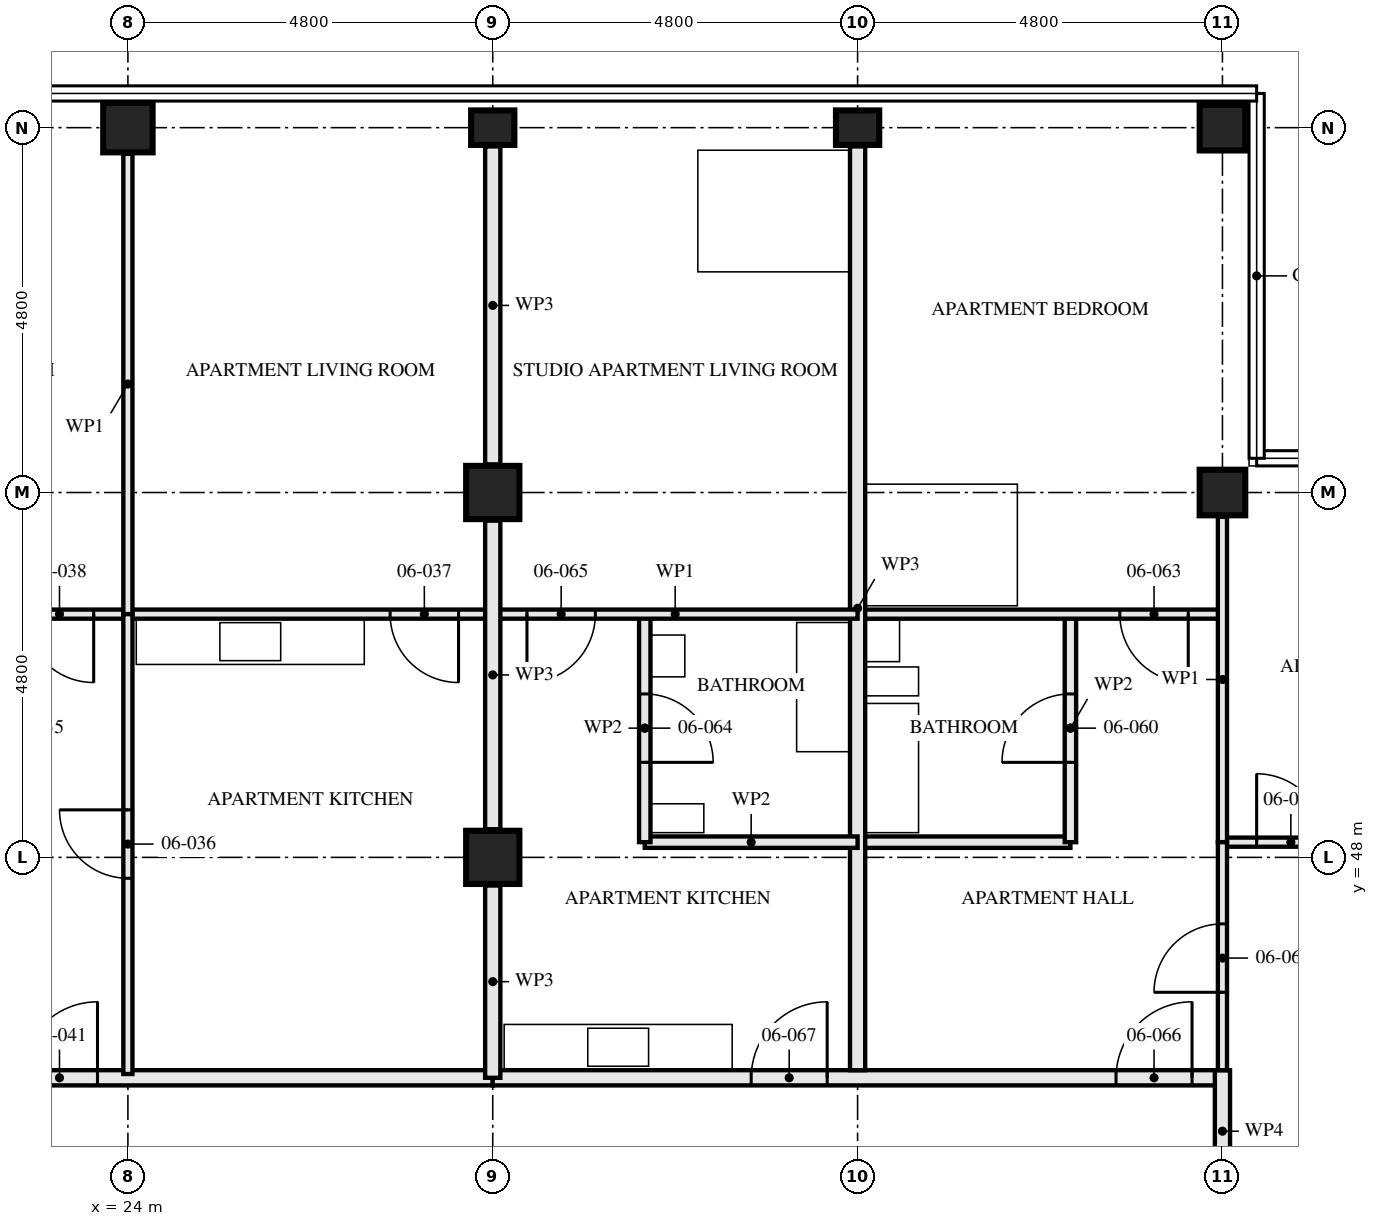
"""IFC4 building model, lengths in metres.
Left out: names, types, materials, properties, quantities, classifications, styles, units other than length and angle.
Written with IfcOpenShell. Run it as: python <this file> out.ifc"""

import sys

from ifc_helpers import new_model, si_unit, direction, frame, frame_2d, origin, origin_2d, place, context, subcontext, project, spatial, rectangle, hollow_rectangle, i_section, extrude, element, fill, save


model = new_model("IFC4")
c1 = context("Model", 3, precision=1e-05, world=origin(), true_north=direction((0.0, 1.0)))
c2 = subcontext(c1, "Body", "Model", "MODEL_VIEW")
j1 = project(units=[si_unit("LENGTHUNIT", "METRE"), si_unit("PLANEANGLEUNIT", "RADIAN")], contexts=[c1])
p1 = place(None, origin())
s1 = spatial("IfcSite", under=j1, at=p1, CompositionType="ELEMENT")
p2 = place(p1, origin())
s2 = spatial("IfcBuilding", under=s1, at=p2, CompositionType="ELEMENT")
p3 = place(p2, frame((0.0, 0.0, 27.0)))
s3 = spatial("IfcBuildingStorey", under=s2, at=p3, CompositionType="ELEMENT", Elevation=27.0)
p4 = place(p3, frame((24.0, 57.6, 0.0), z_axis=(0.0, 0.0, 1.0), x_axis=(0.0, 1.0, 0.0)))
e1 = element("IfcColumn", 1, at=p4, inside=s3, PredefinedType="COLUMN", context=c2, shape_type="SweptSolid", body=[
    extrude(hollow_rectangle(XDim=0.65, YDim=0.65, WallThickness=0.08, at=origin_2d()), origin(), (0.0, 0.0, 1.0), 3.5),
])
for number, where, z_axis, x_axis in (
    (2, (28.8, 48.0, 0.0), (0.0, 0.0, 1.0), (1.0, 0.0, 0.0)),
    (3, (28.8, 52.8, 0.0), (0.0, 0.0, 1.0), (1.0, 0.0, 0.0)),
):
    element("IfcColumn", number, at=place(p3, frame(where, z_axis=z_axis, x_axis=x_axis)), inside=s3, PredefinedType="COLUMN", context=c2, shape_type="SweptSolid", body=[
        extrude(hollow_rectangle(XDim=0.7, YDim=0.7, WallThickness=0.06, at=origin_2d()), origin(), (0.0, 0.0, 1.0), 3.5),
    ])
for number, where, z_axis, x_axis in (
    (4, (28.8, 57.6, 0.0), (0.0, 0.0, 1.0), (0.0, 1.0, 0.0)),
    (5, (33.6, 57.6, 0.0), (0.0, 0.0, 1.0), (0.0, 1.0, 0.0)),
):
    element("IfcColumn", number, at=place(p3, frame(where, z_axis=z_axis, x_axis=x_axis)), inside=s3, PredefinedType="COLUMN", context=c2, shape_type="SweptSolid", body=[
        extrude(i_section(OverallWidth=0.454, OverallDepth=0.569, WebThickness=0.078, FlangeThickness=0.125, FilletRadius=0.015, at=origin_2d()), origin(), (0.0, 0.0, 1.0), 3.5),
    ])
for number, where, z_axis, x_axis in (
    (6, (38.4, 52.8, 0.0), (0.0, 0.0, 1.0), (0.0, 1.0, 0.0)),
    (7, (38.4, 57.6, 0.0), (0.0, 0.0, 1.0), (0.0, 1.0, 0.0)),
):
    element("IfcColumn", number, at=place(p3, frame(where, z_axis=z_axis, x_axis=x_axis)), inside=s3, PredefinedType="COLUMN", context=c2, shape_type="SweptSolid", body=[
        extrude(hollow_rectangle(XDim=0.6, YDim=0.6, WallThickness=0.05, at=origin_2d()), origin(), (0.0, 0.0, 1.0), 3.5),
    ])
p5 = place(p3, frame((24.0, 51.2, 0.0), z_axis=(0.0, 0.0, 1.0), x_axis=(0.0, -1.0, 0.0)))
e8 = element("IfcWall", 8, at=p5, inside=s3, PredefinedType="PARTITIONING", context=c2, shape_type="SweptSolid", body=[
    extrude(rectangle(XDim=6.05, YDim=0.12, at=frame_2d((3.025, 0.0))), origin(), (0.0, 0.0, 1.0), 2.55),
])
p6 = place(p5, frame((2.575, 0.0, 0.0)))
e9 = element("IfcOpeningElement", 9, at=p6, cuts=e8, PredefinedType="OPENING", context=c2, shape_type="SweptSolid", body=[
    extrude(rectangle(XDim=0.9, YDim=2.1, at=frame_2d((0.45, 1.05))), frame((0.0, 0.071, 0.0), z_axis=(0.0, -1.0, 0.0), x_axis=(1.0, 0.0, 0.0)), (0.0, 0.0, 1.0), 0.141),
])
p7 = place(p3, frame((28.8, 51.2, 0.0), z_axis=(0.0, 0.0, 1.0), x_axis=(-1.0, 0.0, 0.0)))
e10 = element("IfcWall", 10, at=p7, inside=s3, PredefinedType="PARTITIONING", context=c2, shape_type="SweptSolid", body=[
    extrude(rectangle(XDim=4.8, YDim=0.12, at=frame_2d((2.4, 0.0))), origin(), (0.0, 0.0, 1.0), 3.33),
])
p8 = place(p7, frame((0.45, 0.0, 0.0)))
e11 = element("IfcOpeningElement", 11, at=p8, cuts=e10, PredefinedType="OPENING", context=c2, shape_type="SweptSolid", body=[
    extrude(rectangle(XDim=0.9, YDim=2.1, at=frame_2d((0.45, 1.05))), frame((0.0, 0.071, 0.0), z_axis=(0.0, -1.0, 0.0), x_axis=(1.0, 0.0, 0.0)), (0.0, 0.0, 1.0), 0.141),
])
p9 = place(p3, frame((24.0, 51.2, 0.0), z_axis=(0.0, 0.0, 1.0), x_axis=(-1.0, 0.0, 0.0)))
e12 = element("IfcWall", 12, at=p9, inside=s3, PredefinedType="PARTITIONING", context=c2, shape_type="SweptSolid", body=[
    extrude(rectangle(XDim=4.8, YDim=0.12, at=frame_2d((2.4, 0.0))), origin(), (0.0, 0.0, 1.0), 3.33),
])
p10 = place(p9, frame((0.45, 0.0, 0.0)))
e13 = element("IfcOpeningElement", 13, at=p10, cuts=e12, PredefinedType="OPENING", context=c2, shape_type="SweptSolid", body=[
    extrude(rectangle(XDim=0.9, YDim=2.1, at=frame_2d((0.45, 1.05))), frame((0.0, 0.071, 0.0), z_axis=(0.0, -1.0, 0.0), x_axis=(1.0, 0.0, 0.0)), (0.0, 0.0, 1.0), 0.141),
])
p11 = place(p3, frame((24.0, 57.255, 0.0), z_axis=(0.0, 0.0, 1.0), x_axis=(0.0, -1.0, 0.0)))
e14 = element("IfcWall", 14, at=p11, inside=s3, PredefinedType="PARTITIONING", context=c2, shape_type="SweptSolid", body=[
    extrude(rectangle(XDim=6.055, YDim=0.12, at=frame_2d((3.027, 0.0))), origin(), (0.0, 0.0, 1.0), 2.55),
])
p12 = place(p3, frame((28.8, 45.1, 0.0), z_axis=(0.0, 0.0, 1.0), x_axis=(-1.0, 0.0, 0.0)))
e15 = element("IfcWall", 15, at=p12, inside=s3, PredefinedType="PARTITIONING", context=c2, shape_type="SweptSolid", body=[
    extrude(rectangle(XDim=14.4, YDim=0.2, at=frame_2d((7.2, 0.0))), origin(), (0.0, 0.0, 1.0), 3.33),
])
p13 = place(p12, frame((5.2, 0.0, 0.0)))
e16 = element("IfcOpeningElement", 16, at=p13, cuts=e15, PredefinedType="OPENING", context=c2, shape_type="SweptSolid", body=[
    extrude(rectangle(XDim=1.0, YDim=2.1, at=frame_2d((0.5, 1.05))), frame((0.0, 0.111, 0.0), z_axis=(0.0, -1.0, 0.0), x_axis=(1.0, 0.0, 0.0)), (0.0, 0.0, 1.0), 0.221),
])
p14 = place(p12, frame((10.0, 0.0, 0.0)))
e17 = element("IfcOpeningElement", 17, at=p14, cuts=e15, PredefinedType="OPENING", context=c2, shape_type="SweptSolid", body=[
    extrude(rectangle(XDim=1.0, YDim=2.1, at=frame_2d((0.5, 1.05))), frame((0.0, 0.111, 0.0), z_axis=(0.0, -1.0, 0.0), x_axis=(1.0, 0.0, 0.0)), (0.0, 0.0, 1.0), 0.221),
])
p15 = place(p3, frame((36.4, 51.2, 0.0), z_axis=(0.0, 0.0, 1.0), x_axis=(0.0, -1.0, 0.0)))
e18 = element("IfcWall", 18, at=p15, inside=s3, PredefinedType="PARTITIONING", context=c2, shape_type="SweptSolid", body=[
    extrude(rectangle(XDim=3.0, YDim=0.15, at=frame_2d((1.5, 0.0))), origin(), (0.0, 0.0, 1.0), 3.33),
])
p16 = place(p15, frame((1.05, 0.0, 0.0)))
e19 = element("IfcOpeningElement", 19, at=p16, cuts=e18, PredefinedType="OPENING", context=c2, shape_type="SweptSolid", body=[
    extrude(rectangle(XDim=0.9, YDim=2.1, at=frame_2d((0.45, 1.05))), frame((0.0, 0.085, 0.0), z_axis=(0.0, -1.0, 0.0), x_axis=(1.0, 0.0, 0.0)), (0.0, 0.0, 1.0), 0.171),
])
p17 = place(p3, frame((36.4, 48.2, 0.0), z_axis=(0.0, 0.0, 1.0), x_axis=(-1.0, 0.0, 0.0)))
e20 = element("IfcWall", 20, at=p17, inside=s3, PredefinedType="PARTITIONING", context=c2, shape_type="SweptSolid", body=[
    extrude(rectangle(XDim=2.8, YDim=0.15, at=frame_2d((1.4, 0.0))), origin(), (0.0, 0.0, 1.0), 3.33),
])
p18 = place(p3, frame((38.4, 48.2, 0.0), z_axis=(0.0, 0.0, 1.0), x_axis=(0.0, -1.0, 0.0)))
e21 = element("IfcWall", 21, at=p18, inside=s3, PredefinedType="PARTITIONING", context=c2, shape_type="SweptSolid", body=[
    extrude(rectangle(XDim=3.0, YDim=0.12, at=frame_2d((1.5, 0.0))), origin(), (0.0, 0.0, 1.0), 2.55),
])
p19 = place(p18, frame((1.075, 0.0, 0.0)))
e22 = element("IfcOpeningElement", 22, at=p19, cuts=e21, PredefinedType="OPENING", context=c2, shape_type="SweptSolid", body=[
    extrude(rectangle(XDim=0.9, YDim=2.1, at=frame_2d((0.45, 1.05))), frame((0.0, 0.071, 0.0), z_axis=(0.0, -1.0, 0.0), x_axis=(1.0, 0.0, 0.0)), (0.0, 0.0, 1.0), 0.141),
])
p20 = place(p3, frame((42.953, 48.2, 0.0), z_axis=(0.0, 0.0, 1.0), x_axis=(-1.0, 0.0, 0.0)))
e23 = element("IfcWall", 23, at=p20, inside=s3, PredefinedType="PARTITIONING", context=c2, shape_type="SweptSolid", body=[
    extrude(rectangle(XDim=4.553, YDim=0.12, at=frame_2d((2.276, 0.0))), origin(), (0.0, 0.0, 1.0), 3.33),
])
p21 = place(p20, frame((3.203, 0.0, 0.0)))
e24 = element("IfcOpeningElement", 24, at=p21, cuts=e23, PredefinedType="OPENING", context=c2, shape_type="SweptSolid", body=[
    extrude(rectangle(XDim=0.9, YDim=2.1, at=frame_2d((0.45, 1.05))), frame((0.0, 0.071, 0.0), z_axis=(0.0, -1.0, 0.0), x_axis=(1.0, 0.0, 0.0)), (0.0, 0.0, 1.0), 0.141),
])
p22 = place(p3, frame((38.4, 51.2, 0.0), z_axis=(0.0, 0.0, 1.0), x_axis=(-1.0, 0.0, 0.0)))
e25 = element("IfcWall", 25, at=p22, inside=s3, PredefinedType="PARTITIONING", context=c2, shape_type="SweptSolid", body=[
    extrude(rectangle(XDim=4.8, YDim=0.12, at=frame_2d((2.4, 0.0))), origin(), (0.0, 0.0, 1.0), 3.33),
])
p23 = place(p22, frame((0.45, 0.0, 0.0)))
e26 = element("IfcOpeningElement", 26, at=p23, cuts=e25, PredefinedType="OPENING", context=c2, shape_type="SweptSolid", body=[
    extrude(rectangle(XDim=0.9, YDim=2.1, at=frame_2d((0.45, 1.05))), frame((0.0, 0.071, 0.0), z_axis=(0.0, -1.0, 0.0), x_axis=(1.0, 0.0, 0.0)), (0.0, 0.0, 1.0), 0.141),
])
p24 = place(p3, frame((38.4, 52.48, 0.0), z_axis=(0.0, 0.0, 1.0), x_axis=(0.0, -1.0, 0.0)))
e27 = element("IfcWall", 27, at=p24, inside=s3, PredefinedType="PARTITIONING", context=c2, shape_type="SweptSolid", body=[
    extrude(rectangle(XDim=4.28, YDim=0.12, at=frame_2d((2.14, 0.0))), origin(), (0.0, 0.0, 1.0), 3.33),
])
p25 = place(p3, frame((33.6, 57.353, 0.0), z_axis=(0.0, 0.0, 1.0), x_axis=(0.0, -1.0, 0.0)))
e28 = element("IfcWall", 28, at=p25, inside=s3, PredefinedType="PARTITIONING", context=c2, shape_type="SweptSolid", body=[
    extrude(rectangle(XDim=12.153, YDim=0.2, at=frame_2d((6.077, 0.0))), origin(), (0.0, 0.0, 1.0), 2.55),
])
p26 = place(p3, frame((30.8, 51.2, 0.0), z_axis=(0.0, 0.0, 1.0), x_axis=(0.0, -1.0, 0.0)))
e29 = element("IfcWall", 29, at=p26, inside=s3, PredefinedType="PARTITIONING", context=c2, shape_type="SweptSolid", body=[
    extrude(rectangle(XDim=3.0, YDim=0.15, at=frame_2d((1.5, 0.0))), origin(), (0.0, 0.0, 1.0), 3.33),
])
p27 = place(p26, frame((1.05, 0.0, 0.0)))
e30 = element("IfcOpeningElement", 30, at=p27, cuts=e29, PredefinedType="OPENING", context=c2, shape_type="SweptSolid", body=[
    extrude(rectangle(XDim=0.9, YDim=2.1, at=frame_2d((0.45, 1.05))), frame((0.0, 0.085, 0.0), z_axis=(0.0, -1.0, 0.0), x_axis=(1.0, 0.0, 0.0)), (0.0, 0.0, 1.0), 0.171),
])
p28 = place(p3, frame((33.6, 48.2, 0.0), z_axis=(0.0, 0.0, 1.0), x_axis=(-1.0, 0.0, 0.0)))
e31 = element("IfcWall", 31, at=p28, inside=s3, PredefinedType="PARTITIONING", context=c2, shape_type="SweptSolid", body=[
    extrude(rectangle(XDim=2.8, YDim=0.15, at=frame_2d((1.4, 0.0))), origin(), (0.0, 0.0, 1.0), 3.33),
])
p29 = place(p3, frame((33.6, 51.2, 0.0), z_axis=(0.0, 0.0, 1.0), x_axis=(-1.0, 0.0, 0.0)))
e32 = element("IfcWall", 32, at=p29, inside=s3, PredefinedType="PARTITIONING", context=c2, shape_type="SweptSolid", body=[
    extrude(rectangle(XDim=4.8, YDim=0.12, at=frame_2d((2.4, 0.0))), origin(), (0.0, 0.0, 1.0), 3.33),
])
p30 = place(p29, frame((3.45, 0.0, 0.0)))
e33 = element("IfcOpeningElement", 33, at=p30, cuts=e32, PredefinedType="OPENING", context=c2, shape_type="SweptSolid", body=[
    extrude(rectangle(XDim=0.9, YDim=2.1, at=frame_2d((0.45, 1.05))), frame((0.0, 0.071, 0.0), z_axis=(0.0, -1.0, 0.0), x_axis=(1.0, 0.0, 0.0)), (0.0, 0.0, 1.0), 0.141),
])
p31 = place(p3, frame((38.4, 45.1, 0.0), z_axis=(0.0, 0.0, 1.0), x_axis=(-1.0, 0.0, 0.0)))
e34 = element("IfcWall", 34, at=p31, inside=s3, PredefinedType="PARTITIONING", context=c2, shape_type="SweptSolid", body=[
    extrude(rectangle(XDim=9.6, YDim=0.2, at=frame_2d((4.8, 0.0))), origin(), (0.0, 0.0, 1.0), 3.33),
])
p32 = place(p31, frame((0.4, 0.0, 0.0)))
e35 = element("IfcOpeningElement", 35, at=p32, cuts=e34, PredefinedType="OPENING", context=c2, shape_type="SweptSolid", body=[
    extrude(rectangle(XDim=1.0, YDim=2.1, at=frame_2d((0.5, 1.05))), frame((0.0, 0.111, 0.0), z_axis=(0.0, -1.0, 0.0), x_axis=(1.0, 0.0, 0.0)), (0.0, 0.0, 1.0), 0.221),
])
p33 = place(p31, frame((5.2, 0.0, 0.0)))
e36 = element("IfcOpeningElement", 36, at=p33, cuts=e34, PredefinedType="OPENING", context=c2, shape_type="SweptSolid", body=[
    extrude(rectangle(XDim=1.0, YDim=2.1, at=frame_2d((0.5, 1.05))), frame((0.0, 0.111, 0.0), z_axis=(0.0, -1.0, 0.0), x_axis=(1.0, 0.0, 0.0)), (0.0, 0.0, 1.0), 0.221),
])
p34 = place(p3, frame((38.4, 45.2, 0.0), z_axis=(0.0, 0.0, 1.0), x_axis=(0.0, -1.0, 0.0)))
e37 = element("IfcWall", 37, at=p34, inside=s3, PredefinedType="PARTITIONING", context=c2, shape_type="SweptSolid", body=[
    extrude(rectangle(XDim=1.605, YDim=0.2, at=frame_2d((0.802, 0.0))), origin(), (0.0, 0.0, 1.0), 3.33),
])
p35 = place(p3, frame((28.8, 45.1, 0.0), z_axis=(0.0, 0.0, 1.0), x_axis=(0.0, 1.0, 0.0)))
e38 = element("IfcWall", 38, at=p35, inside=s3, PredefinedType="PARTITIONING", context=c2, shape_type="SweptSolid", body=[
    extrude(rectangle(XDim=2.53, YDim=0.2, at=frame_2d((1.265, 0.0))), origin(), (0.0, 0.0, 1.0), 2.32),
])
p36 = place(p3, frame((28.8, 48.37, 0.0), z_axis=(0.0, 0.0, 1.0), x_axis=(0.0, 1.0, 0.0)))
e39 = element("IfcWall", 39, at=p36, inside=s3, PredefinedType="PARTITIONING", context=c2, shape_type="SweptSolid", body=[
    extrude(rectangle(XDim=4.06, YDim=0.2, at=frame_2d((2.03, 0.0))), origin(), (0.0, 0.0, 1.0), 2.32),
])
p37 = place(p3, frame((28.8, 53.17, 0.0), z_axis=(0.0, 0.0, 1.0), x_axis=(0.0, 1.0, 0.0)))
e40 = element("IfcWall", 40, at=p37, inside=s3, PredefinedType="PARTITIONING", context=c2, shape_type="SweptSolid", body=[
    extrude(rectangle(XDim=4.183, YDim=0.2, at=frame_2d((2.092, 0.0))), origin(), (0.0, 0.0, 1.0), 2.32),
])
p38 = place(p6, frame((0.9, 0.0, 0.0), z_axis=(0.0, 0.0, 1.0), x_axis=(-1.0, 0.0, 0.0)))
e41 = element("IfcDoor", 41, at=p38, inside=s3, OperationType="SINGLE_SWING_LEFT", PredefinedType="DOOR", context=c2, shape_type="SweptSolid", body=[
    extrude(rectangle(XDim=0.9, YDim=2.1, at=frame_2d((0.45, 1.05))), frame((0.0, 0.022, 0.0), z_axis=(0.0, -1.0, 0.0), x_axis=(1.0, 0.0, 0.0)), (0.0, 0.0, 1.0), 0.044),
])
fill(e9, e41)
p39 = place(p8, origin())
e42 = element("IfcDoor", 42, at=p39, inside=s3, OperationType="SINGLE_SWING_RIGHT", PredefinedType="DOOR", context=c2, shape_type="SweptSolid", body=[
    extrude(rectangle(XDim=0.9, YDim=2.1, at=frame_2d((0.45, 1.05))), frame((0.0, 0.022, 0.0), z_axis=(0.0, -1.0, 0.0), x_axis=(1.0, 0.0, 0.0)), (0.0, 0.0, 1.0), 0.044),
])
fill(e11, e42)
p40 = place(p10, origin())
e43 = element("IfcDoor", 43, at=p40, inside=s3, OperationType="SINGLE_SWING_RIGHT", PredefinedType="DOOR", context=c2, shape_type="SweptSolid", body=[
    extrude(rectangle(XDim=0.9, YDim=2.1, at=frame_2d((0.45, 1.05))), frame((0.0, 0.022, 0.0), z_axis=(0.0, -1.0, 0.0), x_axis=(1.0, 0.0, 0.0)), (0.0, 0.0, 1.0), 0.044),
])
fill(e13, e43)
p41 = place(p13, frame((1.0, 0.0, 0.0), z_axis=(0.0, 0.0, 1.0), x_axis=(-1.0, 0.0, 0.0)))
e44 = element("IfcDoor", 44, at=p41, inside=s3, OperationType="SINGLE_SWING_LEFT", PredefinedType="DOOR", context=c2, shape_type="SweptSolid", body=[
    extrude(rectangle(XDim=1.0, YDim=2.1, at=frame_2d((0.5, 1.05))), frame((0.0, 0.027, 0.0), z_axis=(0.0, -1.0, 0.0), x_axis=(1.0, 0.0, 0.0)), (0.0, 0.0, 1.0), 0.054),
])
fill(e16, e44)
p42 = place(p16, frame((0.9, 0.0, 0.0), z_axis=(0.0, 0.0, 1.0), x_axis=(-1.0, 0.0, 0.0)))
e45 = element("IfcDoor", 45, at=p42, inside=s3, OperationType="SINGLE_SWING_RIGHT", PredefinedType="DOOR", context=c2, shape_type="SweptSolid", body=[
    extrude(rectangle(XDim=0.9, YDim=2.1, at=frame_2d((0.45, 1.05))), frame((0.0, 0.022, 0.0), z_axis=(0.0, -1.0, 0.0), x_axis=(1.0, 0.0, 0.0)), (0.0, 0.0, 1.0), 0.044),
])
fill(e19, e45)
p43 = place(p19, frame((0.9, 0.0, 0.0), z_axis=(0.0, 0.0, 1.0), x_axis=(-1.0, 0.0, 0.0)))
e46 = element("IfcDoor", 46, at=p43, inside=s3, OperationType="SINGLE_SWING_RIGHT", PredefinedType="DOOR", context=c2, shape_type="SweptSolid", body=[
    extrude(rectangle(XDim=0.9, YDim=2.1, at=frame_2d((0.45, 1.05))), frame((0.0, 0.022, 0.0), z_axis=(0.0, -1.0, 0.0), x_axis=(1.0, 0.0, 0.0)), (0.0, 0.0, 1.0), 0.044),
])
fill(e22, e46)
p44 = place(p21, frame((0.9, 0.0, 0.0), z_axis=(0.0, 0.0, 1.0), x_axis=(-1.0, 0.0, 0.0)))
e47 = element("IfcDoor", 47, at=p44, inside=s3, OperationType="SINGLE_SWING_RIGHT", PredefinedType="DOOR", context=c2, shape_type="SweptSolid", body=[
    extrude(rectangle(XDim=0.9, YDim=2.1, at=frame_2d((0.45, 1.05))), frame((0.0, 0.022, 0.0), z_axis=(0.0, -1.0, 0.0), x_axis=(1.0, 0.0, 0.0)), (0.0, 0.0, 1.0), 0.044),
])
fill(e24, e47)
p45 = place(p23, origin())
e48 = element("IfcDoor", 48, at=p45, inside=s3, OperationType="SINGLE_SWING_RIGHT", PredefinedType="DOOR", context=c2, shape_type="SweptSolid", body=[
    extrude(rectangle(XDim=0.9, YDim=2.1, at=frame_2d((0.45, 1.05))), frame((0.0, 0.022, 0.0), z_axis=(0.0, -1.0, 0.0), x_axis=(1.0, 0.0, 0.0)), (0.0, 0.0, 1.0), 0.044),
])
fill(e26, e48)
p46 = place(p27, origin())
e49 = element("IfcDoor", 49, at=p46, inside=s3, OperationType="SINGLE_SWING_LEFT", PredefinedType="DOOR", context=c2, shape_type="SweptSolid", body=[
    extrude(rectangle(XDim=0.9, YDim=2.1, at=frame_2d((0.45, 1.05))), frame((0.0, 0.022, 0.0), z_axis=(0.0, -1.0, 0.0), x_axis=(1.0, 0.0, 0.0)), (0.0, 0.0, 1.0), 0.044),
])
fill(e30, e49)
p47 = place(p30, origin())
e50 = element("IfcDoor", 50, at=p47, inside=s3, OperationType="SINGLE_SWING_LEFT", PredefinedType="DOOR", context=c2, shape_type="SweptSolid", body=[
    extrude(rectangle(XDim=0.9, YDim=2.1, at=frame_2d((0.45, 1.05))), frame((0.0, 0.022, 0.0), z_axis=(0.0, -1.0, 0.0), x_axis=(1.0, 0.0, 0.0)), (0.0, 0.0, 1.0), 0.044),
])
fill(e33, e50)
p48 = place(p32, frame((1.0, 0.0, 0.0), z_axis=(0.0, 0.0, 1.0), x_axis=(-1.0, 0.0, 0.0)))
e51 = element("IfcDoor", 51, at=p48, inside=s3, OperationType="SINGLE_SWING_LEFT", PredefinedType="DOOR", context=c2, shape_type="SweptSolid", body=[
    extrude(rectangle(XDim=1.0, YDim=2.1, at=frame_2d((0.5, 1.05))), frame((0.0, 0.027, 0.0), z_axis=(0.0, -1.0, 0.0), x_axis=(1.0, 0.0, 0.0)), (0.0, 0.0, 1.0), 0.054),
])
fill(e35, e51)
p49 = place(p33, frame((1.0, 0.0, 0.0), z_axis=(0.0, 0.0, 1.0), x_axis=(-1.0, 0.0, 0.0)))
e52 = element("IfcDoor", 52, at=p49, inside=s3, OperationType="SINGLE_SWING_LEFT", PredefinedType="DOOR", context=c2, shape_type="SweptSolid", body=[
    extrude(rectangle(XDim=1.0, YDim=2.1, at=frame_2d((0.5, 1.05))), frame((0.0, 0.027, 0.0), z_axis=(0.0, -1.0, 0.0), x_axis=(1.0, 0.0, 0.0)), (0.0, 0.0, 1.0), 0.054),
])
fill(e36, e52)
save(model, sys.argv[1])
